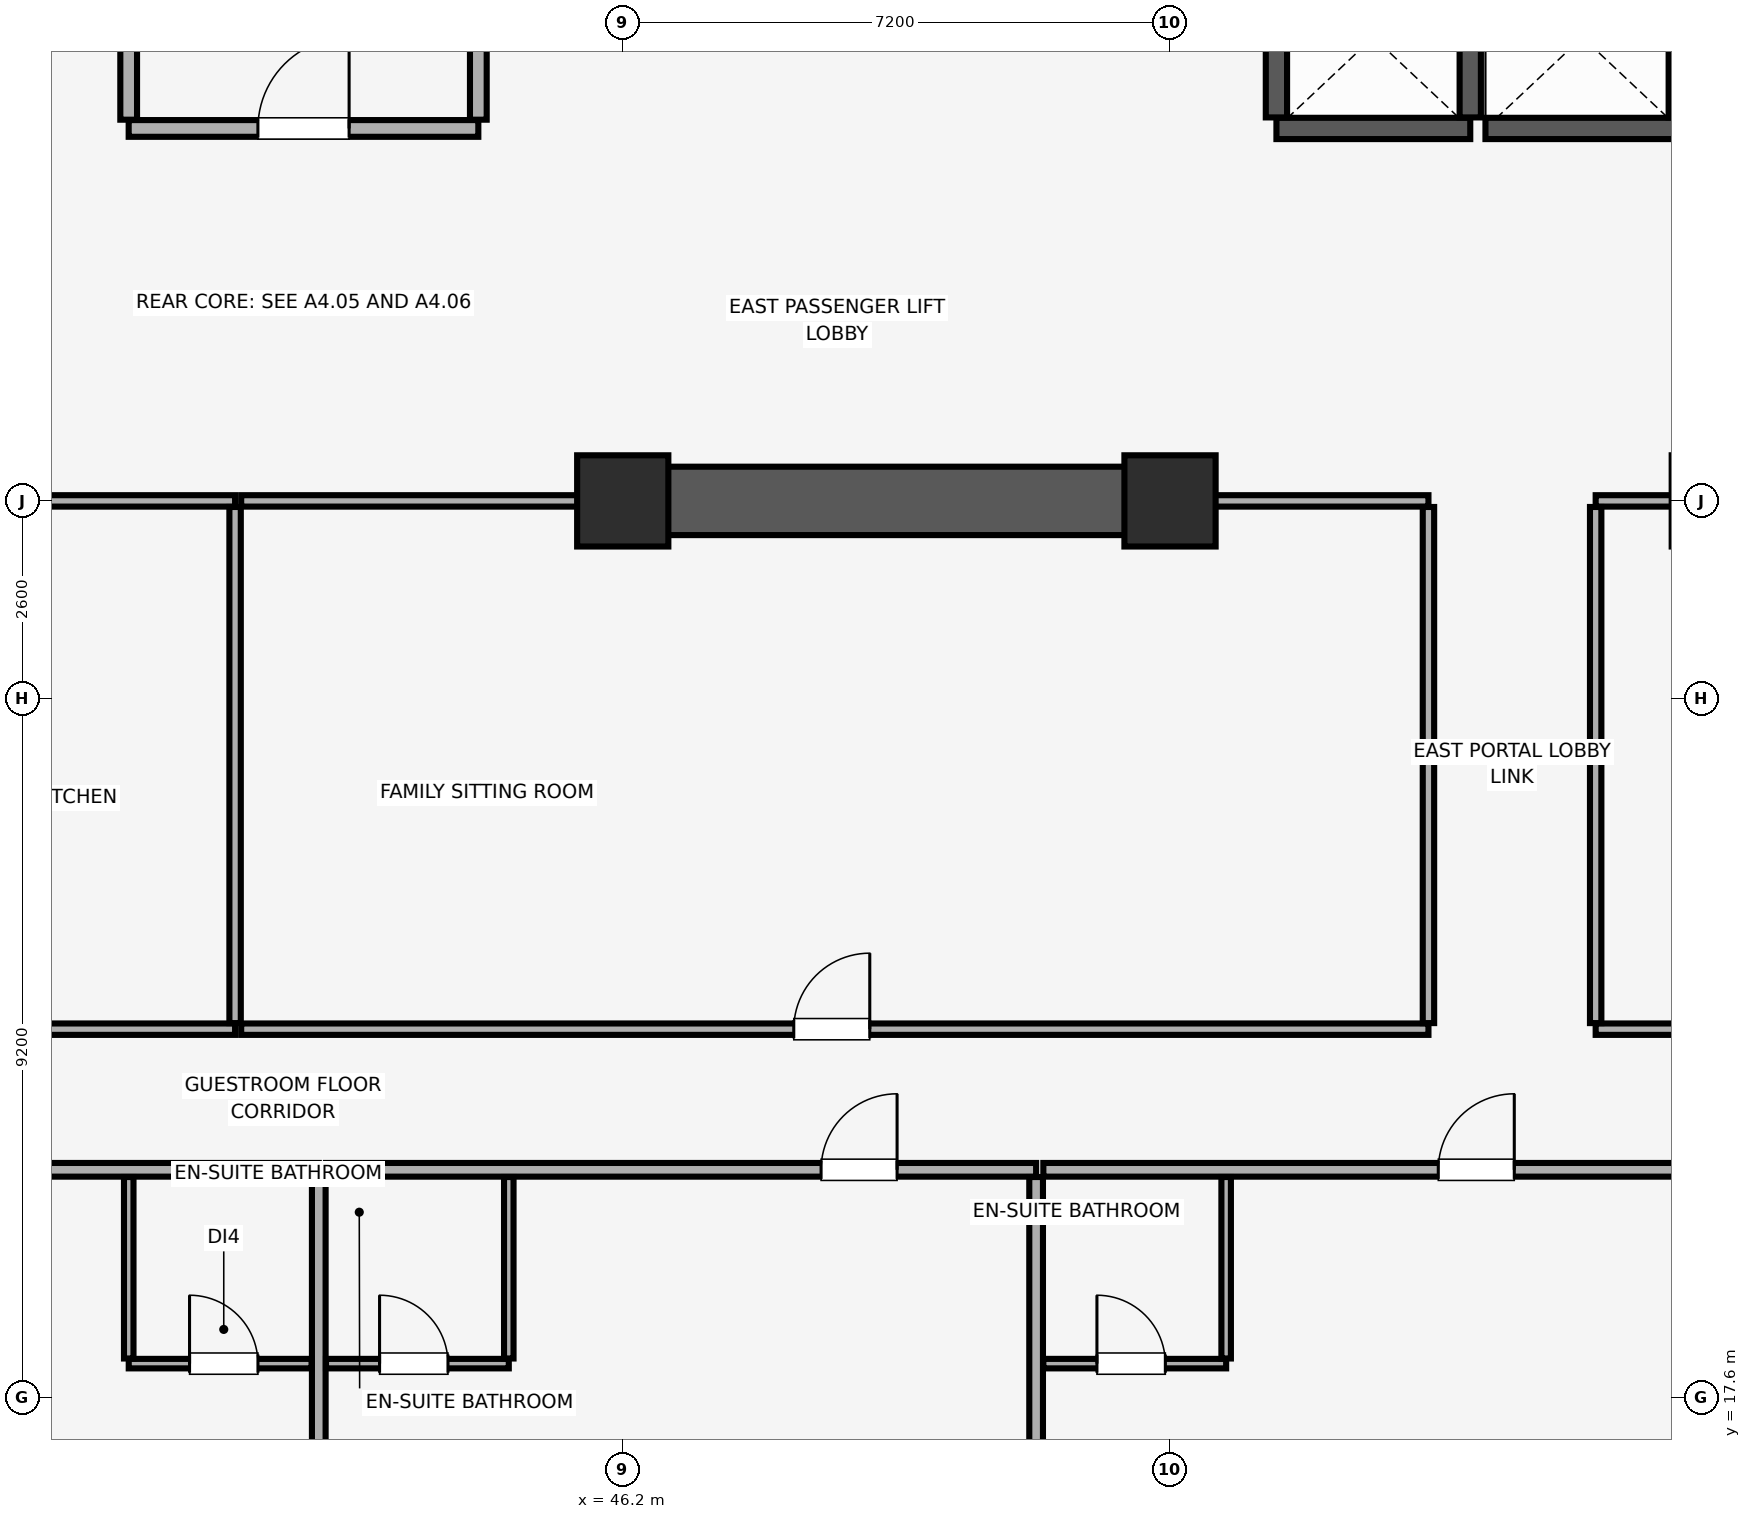
"""IFC4 building model, lengths in metres.
Left out: names, types, materials, properties, quantities, classifications, styles, units other than length and angle.
Written with IfcOpenShell. Run it as: python <this file> out.ifc"""

import sys

from ifc_helpers import new_model, si_unit, direction, frame, frame_2d, origin, origin_2d, place, context, subcontext, project, spatial, rectangle, extrude, element, fill, save


model = new_model("IFC4")
c1 = context("Model", 3, precision=1e-05, world=origin(), true_north=direction((0.0, 1.0)))
c2 = subcontext(c1, "Body", "Model", "MODEL_VIEW")
j1 = project(units=[si_unit("LENGTHUNIT", "METRE"), si_unit("PLANEANGLEUNIT", "RADIAN")], contexts=[c1])
p1 = place(None, origin())
s1 = spatial("IfcSite", under=j1, at=p1, CompositionType="ELEMENT")
p2 = place(p1, origin())
s2 = spatial("IfcBuilding", under=s1, at=p2, CompositionType="ELEMENT")
p3 = place(p2, frame((0.0, 0.0, 93.05)))
s3 = spatial("IfcBuildingStorey", under=s2, at=p3, CompositionType="ELEMENT", Elevation=93.05)
for number, where, z_axis, x_axis in (
    (1, (46.2, 29.4, 0.0), (0.0, 0.0, 1.0), (1.0, 0.0, 0.0)),
    (2, (53.4, 29.4, 0.0), (0.0, 0.0, 1.0), (1.0, 0.0, 0.0)),
):
    element("IfcColumn", number, at=place(p3, frame(where, z_axis=z_axis, x_axis=x_axis)), inside=s3, PredefinedType="COLUMN", context=c2, shape_type="SweptSolid", body=[
        extrude(rectangle(XDim=1.2, YDim=1.2, at=origin_2d()), origin(), (0.0, 0.0, 1.0), 3.51),
    ])
p4 = place(p3, frame((46.0, 29.4, 0.0), z_axis=(0.0, 0.0, 1.0), x_axis=(1.0, 0.0, 0.0)))
e3 = element("IfcWall", 3, at=p4, inside=s3, PredefinedType="SHEAR", context=c2, shape_type="SweptSolid", body=[
    extrude(rectangle(XDim=7.6, YDim=0.9, at=frame_2d((3.8, 0.0))), origin(), (0.0, 0.0, 1.0), 3.51),
])
p5 = place(p3, frame((54.8, 34.3, 0.0), z_axis=(0.0, 0.0, 1.0), x_axis=(1.0, 0.0, 0.0)))
e4 = element("IfcWall", 4, at=p5, inside=s3, PredefinedType="SHEAR", context=c2, shape_type="SweptSolid", body=[
    extrude(rectangle(XDim=2.55, YDim=0.28, at=frame_2d((1.275, 0.0))), origin(), (0.0, 0.0, 1.0), 3.51),
])
for number, where, z_axis, x_axis in (
    (5, (54.8, 34.445, 0.0), (0.0, 0.0, 1.0), (0.0, 1.0, 0.0)),
    (6, (57.35, 34.445, 0.0), (0.0, 0.0, 1.0), (0.0, 1.0, 0.0)),
):
    element("IfcWall", number, at=place(p3, frame(where, z_axis=z_axis, x_axis=x_axis)), inside=s3, PredefinedType="SHEAR", context=c2, shape_type="SweptSolid", body=[
        extrude(rectangle(XDim=2.11, YDim=0.28, at=frame_2d((1.055, 0.0))), origin(), (0.0, 0.0, 1.0), 3.51),
    ])
p6 = place(p3, frame((57.55, 34.3, 0.0), z_axis=(0.0, 0.0, 1.0), x_axis=(1.0, 0.0, 0.0)))
e7 = element("IfcWall", 7, at=p6, inside=s3, PredefinedType="SHEAR", context=c2, shape_type="SweptSolid", body=[
    extrude(rectangle(XDim=2.55, YDim=0.28, at=frame_2d((1.275, 0.0))), origin(), (0.0, 0.0, 1.0), 3.51),
])
p7 = place(p3, frame((60.1, 34.445, 0.0), z_axis=(0.0, 0.0, 1.0), x_axis=(0.0, 1.0, 0.0)))
e8 = element("IfcWall", 8, at=p7, inside=s3, PredefinedType="SHEAR", context=c2, shape_type="SweptSolid", body=[
    extrude(rectangle(XDim=2.11, YDim=0.28, at=frame_2d((1.055, 0.0))), origin(), (0.0, 0.0, 1.0), 3.51),
])
p8 = place(p3, frame((39.7, 34.3, 0.0), z_axis=(0.0, 0.0, 1.0), x_axis=(1.0, 0.0, 0.0)))
e9 = element("IfcWall", 9, at=p8, inside=s3, PredefinedType="PARTITIONING", context=c2, shape_type="SweptSolid", body=[
    extrude(rectangle(XDim=4.6, YDim=0.22, at=frame_2d((2.3, 0.0))), origin(), (0.0, 0.0, 1.0), 3.51),
])
p9 = place(p8, frame((1.7, 0.0, 0.0)))
e10 = element("IfcOpeningElement", 10, at=p9, cuts=e9, PredefinedType="OPENING", context=c2, shape_type="SweptSolid", body=[
    extrude(rectangle(XDim=1.2, YDim=2.15, at=frame_2d((0.6, 1.075))), frame((0.0, 0.12, 0.0), z_axis=(0.0, -1.0, 0.0), x_axis=(1.0, 0.0, 0.0)), (0.0, 0.0, 1.0), 0.24),
])
for number, where, z_axis, x_axis in (
    (11, (39.7, 34.415, 0.0), (0.0, 0.0, 1.0), (0.0, 1.0, 0.0)),
    (12, (44.3, 34.415, 0.0), (0.0, 0.0, 1.0), (0.0, 1.0, 0.0)),
):
    element("IfcWall", number, at=place(p3, frame(where, z_axis=z_axis, x_axis=x_axis)), inside=s3, PredefinedType="PARTITIONING", context=c2, shape_type="SweptSolid", body=[
        extrude(rectangle(XDim=5.785, YDim=0.22, at=frame_2d((2.893, 0.0))), origin(), (0.0, 0.0, 1.0), 3.51),
    ])
p10 = place(p3, frame((32.858, 20.6, 0.0), z_axis=(0.0, 0.0, 1.0), x_axis=(1.0, 0.0, 0.0)))
e13 = element("IfcWall", 13, at=p10, inside=s3, PredefinedType="PARTITIONING", context=c2, shape_type="SweptSolid", body=[
    extrude(rectangle(XDim=9.343, YDim=0.18, at=frame_2d((4.671, 0.0))), origin(), (0.0, 0.0, 1.0), 3.51),
])
p11 = place(p10, frame((1.533, 0.0, 0.0)))
e14 = element("IfcOpeningElement", 14, at=p11, cuts=e13, PredefinedType="OPENING", context=c2, shape_type="SweptSolid", body=[
    extrude(rectangle(XDim=1.0, YDim=2.15, at=frame_2d((0.5, 1.075))), frame((0.0, 0.1, 0.0), z_axis=(0.0, -1.0, 0.0), x_axis=(1.0, 0.0, 0.0)), (0.0, 0.0, 1.0), 0.2),
])
p12 = place(p3, frame((42.201, 0.15, 0.0), z_axis=(0.0, 0.0, 1.0), x_axis=(0.0, 1.0, 0.0)))
e15 = element("IfcWall", 15, at=p12, inside=s3, PredefinedType="PARTITIONING", context=c2, shape_type="SweptSolid", body=[
    extrude(rectangle(XDim=20.355, YDim=0.18, at=frame_2d((10.177, 0.0))), origin(), (0.0, 0.0, 1.0), 2.898),
])
p13 = place(p3, frame((39.701, 18.05, 0.0), z_axis=(0.0, 0.0, 1.0), x_axis=(1.0, 0.0, 0.0)))
e16 = element("IfcWall", 16, at=p13, inside=s3, PredefinedType="PARTITIONING", context=c2, shape_type="SweptSolid", body=[
    extrude(rectangle(XDim=2.405, YDim=0.125, at=frame_2d((1.203, 0.0))), origin(), (0.0, 0.0, 1.0), 3.51),
])
p14 = place(p13, frame((0.8, 0.0, 0.0)))
e17 = element("IfcOpeningElement", 17, at=p14, cuts=e16, PredefinedType="OPENING", context=c2, shape_type="SweptSolid", body=[
    extrude(rectangle(XDim=0.9, YDim=2.1, at=frame_2d((0.45, 1.05))), frame((0.0, 0.073, 0.0), z_axis=(0.0, -1.0, 0.0), x_axis=(1.0, 0.0, 0.0)), (0.0, 0.0, 1.0), 0.145),
])
p15 = place(p3, frame((39.701, 18.117, 0.0), z_axis=(0.0, 0.0, 1.0), x_axis=(0.0, 1.0, 0.0)))
e18 = element("IfcWall", 18, at=p15, inside=s3, PredefinedType="PARTITIONING", context=c2, shape_type="SweptSolid", body=[
    extrude(rectangle(XDim=2.387, YDim=0.125, at=frame_2d((1.194, 0.0))), origin(), (0.0, 0.0, 1.0), 3.51),
])
p16 = place(p3, frame((42.296, 20.6, 0.0), z_axis=(0.0, 0.0, 1.0), x_axis=(1.0, 0.0, 0.0)))
e19 = element("IfcWall", 19, at=p16, inside=s3, PredefinedType="PARTITIONING", context=c2, shape_type="SweptSolid", body=[
    extrude(rectangle(XDim=9.343, YDim=0.18, at=frame_2d((4.671, 0.0))), origin(), (0.0, 0.0, 1.0), 3.51),
])
p17 = place(p16, frame((6.513, 0.0, 0.0)))
e20 = element("IfcOpeningElement", 20, at=p17, cuts=e19, PredefinedType="OPENING", context=c2, shape_type="SweptSolid", body=[
    extrude(rectangle(XDim=1.0, YDim=2.15, at=frame_2d((0.5, 1.075))), frame((0.0, 0.1, 0.0), z_axis=(0.0, -1.0, 0.0), x_axis=(1.0, 0.0, 0.0)), (0.0, 0.0, 1.0), 0.2),
])
p18 = place(p3, frame((51.638, 0.15, 0.0), z_axis=(0.0, 0.0, 1.0), x_axis=(0.0, 1.0, 0.0)))
e21 = element("IfcWall", 21, at=p18, inside=s3, PredefinedType="PARTITIONING", context=c2, shape_type="SweptSolid", body=[
    extrude(rectangle(XDim=20.355, YDim=0.18, at=frame_2d((10.177, 0.0))), origin(), (0.0, 0.0, 1.0), 3.51),
])
p19 = place(p3, frame((42.296, 18.05, 0.0), z_axis=(0.0, 0.0, 1.0), x_axis=(1.0, 0.0, 0.0)))
e22 = element("IfcWall", 22, at=p19, inside=s3, PredefinedType="PARTITIONING", context=c2, shape_type="SweptSolid", body=[
    extrude(rectangle(XDim=2.405, YDim=0.125, at=frame_2d((1.202, 0.0))), origin(), (0.0, 0.0, 1.0), 3.51),
])
p20 = place(p19, frame((0.705, 0.0, 0.0)))
e23 = element("IfcOpeningElement", 23, at=p20, cuts=e22, PredefinedType="OPENING", context=c2, shape_type="SweptSolid", body=[
    extrude(rectangle(XDim=0.9, YDim=2.1, at=frame_2d((0.45, 1.05))), frame((0.0, 0.073, 0.0), z_axis=(0.0, -1.0, 0.0), x_axis=(1.0, 0.0, 0.0)), (0.0, 0.0, 1.0), 0.145),
])
p21 = place(p3, frame((44.701, 18.117, 0.0), z_axis=(0.0, 0.0, 1.0), x_axis=(0.0, 1.0, 0.0)))
e24 = element("IfcWall", 24, at=p21, inside=s3, PredefinedType="PARTITIONING", context=c2, shape_type="SweptSolid", body=[
    extrude(rectangle(XDim=2.387, YDim=0.125, at=frame_2d((1.194, 0.0))), origin(), (0.0, 0.0, 1.0), 3.51),
])
p22 = place(p3, frame((51.733, 20.6, 0.0), z_axis=(0.0, 0.0, 1.0), x_axis=(1.0, 0.0, 0.0)))
e25 = element("IfcWall", 25, at=p22, inside=s3, PredefinedType="PARTITIONING", context=c2, shape_type="SweptSolid", body=[
    extrude(rectangle(XDim=9.343, YDim=0.18, at=frame_2d((4.671, 0.0))), origin(), (0.0, 0.0, 1.0), 3.51),
])
p23 = place(p22, frame((5.196, 0.0, 0.0)))
e26 = element("IfcOpeningElement", 26, at=p23, cuts=e25, PredefinedType="OPENING", context=c2, shape_type="SweptSolid", body=[
    extrude(rectangle(XDim=1.0, YDim=2.15, at=frame_2d((0.5, 1.075))), frame((0.0, 0.1, 0.0), z_axis=(0.0, -1.0, 0.0), x_axis=(1.0, 0.0, 0.0)), (0.0, 0.0, 1.0), 0.2),
])
p24 = place(p3, frame((51.733, 18.05, 0.0), z_axis=(0.0, 0.0, 1.0), x_axis=(1.0, 0.0, 0.0)))
e27 = element("IfcWall", 27, at=p24, inside=s3, PredefinedType="PARTITIONING", context=c2, shape_type="SweptSolid", body=[
    extrude(rectangle(XDim=2.405, YDim=0.125, at=frame_2d((1.203, 0.0))), origin(), (0.0, 0.0, 1.0), 3.51),
])
p25 = place(p24, frame((0.705, 0.0, 0.0)))
e28 = element("IfcOpeningElement", 28, at=p25, cuts=e27, PredefinedType="OPENING", context=c2, shape_type="SweptSolid", body=[
    extrude(rectangle(XDim=0.9, YDim=2.1, at=frame_2d((0.45, 1.05))), frame((0.0, 0.073, 0.0), z_axis=(0.0, -1.0, 0.0), x_axis=(1.0, 0.0, 0.0)), (0.0, 0.0, 1.0), 0.145),
])
p26 = place(p3, frame((54.138, 18.117, 0.0), z_axis=(0.0, 0.0, 1.0), x_axis=(0.0, 1.0, 0.0)))
e29 = element("IfcWall", 29, at=p26, inside=s3, PredefinedType="PARTITIONING", context=c2, shape_type="SweptSolid", body=[
    extrude(rectangle(XDim=2.387, YDim=0.125, at=frame_2d((1.194, 0.0))), origin(), (0.0, 0.0, 1.0), 3.51),
])
p27 = place(p3, frame((27.2, 22.45, 0.0), z_axis=(0.0, 0.0, 1.0), x_axis=(1.0, 0.0, 0.0)))
e30 = element("IfcWall", 30, at=p27, inside=s3, PredefinedType="PARTITIONING", context=c2, shape_type="SweptSolid", body=[
    extrude(rectangle(XDim=13.9, YDim=0.15, at=frame_2d((6.95, 0.0))), origin(), (0.0, 0.0, 1.0), 3.51),
])
p28 = place(p27, frame((6.45, 0.0, 0.0)))
e31 = element("IfcOpeningElement", 31, at=p28, cuts=e30, PredefinedType="OPENING", context=c2, shape_type="SweptSolid", body=[
    extrude(rectangle(XDim=1.0, YDim=2.15, at=frame_2d((0.5, 1.075))), frame((0.0, 0.085, 0.0), z_axis=(0.0, -1.0, 0.0), x_axis=(1.0, 0.0, 0.0)), (0.0, 0.0, 1.0), 0.17),
])
p29 = place(p3, frame((38.01, 29.4, 0.0), z_axis=(0.0, 0.0, 1.0), x_axis=(1.0, 0.0, 0.0)))
e32 = element("IfcWall", 32, at=p29, inside=s3, PredefinedType="PARTITIONING", context=c2, shape_type="SweptSolid", body=[
    extrude(rectangle(XDim=3.09, YDim=0.15, at=frame_2d((1.545, 0.0))), origin(), (0.0, 0.0, 1.0), 2.41),
])
p30 = place(p3, frame((41.1, 22.53, 0.0), z_axis=(0.0, 0.0, 1.0), x_axis=(0.0, 1.0, 0.0)))
e33 = element("IfcWall", 33, at=p30, inside=s3, PredefinedType="PARTITIONING", context=c2, shape_type="SweptSolid", body=[
    extrude(rectangle(XDim=6.79, YDim=0.15, at=frame_2d((3.395, 0.0))), origin(), (0.0, 0.0, 1.0), 3.51),
])
p31 = place(p3, frame((41.18, 22.45, 0.0), z_axis=(0.0, 0.0, 1.0), x_axis=(1.0, 0.0, 0.0)))
e34 = element("IfcWall", 34, at=p31, inside=s3, PredefinedType="PARTITIONING", context=c2, shape_type="SweptSolid", body=[
    extrude(rectangle(XDim=15.62, YDim=0.15, at=frame_2d((7.81, 0.0))), origin(), (0.0, 0.0, 1.0), 3.51),
])
p32 = place(p31, frame((7.27, 0.0, 0.0)))
e35 = element("IfcOpeningElement", 35, at=p32, cuts=e34, PredefinedType="OPENING", context=c2, shape_type="SweptSolid", body=[
    extrude(rectangle(XDim=1.0, YDim=2.15, at=frame_2d((0.5, 1.075))), frame((0.0, 0.085, 0.0), z_axis=(0.0, -1.0, 0.0), x_axis=(1.0, 0.0, 0.0)), (0.0, 0.0, 1.0), 0.17),
])
p33 = place(p3, frame((41.18, 29.4, 0.0), z_axis=(0.0, 0.0, 1.0), x_axis=(1.0, 0.0, 0.0)))
e36 = element("IfcWall", 36, at=p33, inside=s3, PredefinedType="PARTITIONING", context=c2, shape_type="SweptSolid", body=[
    extrude(rectangle(XDim=4.81, YDim=0.15, at=frame_2d((2.405, 0.0))), origin(), (0.0, 0.0, 1.0), 2.41),
])
p34 = place(p3, frame((53.61, 29.4, 0.0), z_axis=(0.0, 0.0, 1.0), x_axis=(1.0, 0.0, 0.0)))
e37 = element("IfcWall", 37, at=p34, inside=s3, PredefinedType="PARTITIONING", context=c2, shape_type="SweptSolid", body=[
    extrude(rectangle(XDim=3.19, YDim=0.15, at=frame_2d((1.595, 0.0))), origin(), (0.0, 0.0, 1.0), 2.41),
])
p35 = place(p3, frame((56.8, 22.53, 0.0), z_axis=(0.0, 0.0, 1.0), x_axis=(0.0, 1.0, 0.0)))
e38 = element("IfcWall", 38, at=p35, inside=s3, PredefinedType="PARTITIONING", context=c2, shape_type="SweptSolid", body=[
    extrude(rectangle(XDim=6.79, YDim=0.15, at=frame_2d((3.395, 0.0))), origin(), (0.0, 0.0, 1.0), 2.977),
])
p36 = place(p3, frame((59.0, 22.45, 0.0), z_axis=(0.0, 0.0, 1.0), x_axis=(1.0, 0.0, 0.0)))
e39 = element("IfcWall", 39, at=p36, inside=s3, PredefinedType="PARTITIONING", context=c2, shape_type="SweptSolid", body=[
    extrude(rectangle(XDim=9.2, YDim=0.15, at=frame_2d((4.6, 0.0))), origin(), (0.0, 0.0, 1.0), 3.51),
])
p37 = place(p36, frame((4.1, 0.0, 0.0)))
e40 = element("IfcOpeningElement", 40, at=p37, cuts=e39, PredefinedType="OPENING", context=c2, shape_type="SweptSolid", body=[
    extrude(rectangle(XDim=1.0, YDim=2.15, at=frame_2d((0.5, 1.075))), frame((0.0, 0.085, 0.0), z_axis=(0.0, -1.0, 0.0), x_axis=(1.0, 0.0, 0.0)), (0.0, 0.0, 1.0), 0.17),
])
p38 = place(p3, frame((59.0, 29.4, 0.0), z_axis=(0.0, 0.0, 1.0), x_axis=(1.0, 0.0, 0.0)))
e41 = element("IfcWall", 41, at=p38, inside=s3, PredefinedType="PARTITIONING", context=c2, shape_type="SweptSolid", body=[
    extrude(rectangle(XDim=1.39, YDim=0.15, at=frame_2d((0.695, 0.0))), origin(), (0.0, 0.0, 1.0), 2.41),
])
p39 = place(p3, frame((59.0, 22.53, 0.0), z_axis=(0.0, 0.0, 1.0), x_axis=(0.0, 1.0, 0.0)))
e42 = element("IfcWall", 42, at=p39, inside=s3, PredefinedType="PARTITIONING", context=c2, shape_type="SweptSolid", body=[
    extrude(rectangle(XDim=6.79, YDim=0.15, at=frame_2d((3.395, 0.0))), origin(), (0.0, 0.0, 1.0), 3.51),
])
p40 = place(p9, origin())
e43 = element("IfcDoor", 43, at=p40, inside=s3, OperationType="SINGLE_SWING_RIGHT", PredefinedType="DOOR", context=c2, shape_type="SweptSolid", body=[
    extrude(rectangle(XDim=1.2, YDim=2.15, at=frame_2d((0.6, 1.075))), frame((0.0, 0.025, 0.0), z_axis=(0.0, -1.0, 0.0), x_axis=(1.0, 0.0, 0.0)), (0.0, 0.0, 1.0), 0.05),
])
fill(e10, e43)
p41 = place(p14, origin())
e44 = element("IfcDoor", 44, at=p41, inside=s3, OperationType="SINGLE_SWING_LEFT", PredefinedType="DOOR", context=c2, shape_type="SweptSolid", body=[
    extrude(rectangle(XDim=0.9, YDim=2.1, at=frame_2d((0.45, 1.05))), frame((0.0, 0.025, 0.0), z_axis=(0.0, -1.0, 0.0), x_axis=(1.0, 0.0, 0.0)), (0.0, 0.0, 1.0), 0.05),
])
fill(e17, e44)
p42 = place(p17, origin())
e45 = element("IfcDoor", 45, at=p42, inside=s3, OperationType="SINGLE_SWING_RIGHT", PredefinedType="DOOR", context=c2, shape_type="SweptSolid", body=[
    extrude(rectangle(XDim=1.0, YDim=2.15, at=frame_2d((0.5, 1.075))), frame((0.0, 0.025, 0.0), z_axis=(0.0, -1.0, 0.0), x_axis=(1.0, 0.0, 0.0)), (0.0, 0.0, 1.0), 0.05),
])
fill(e20, e45)
p43 = place(p20, origin())
e46 = element("IfcDoor", 46, at=p43, inside=s3, OperationType="SINGLE_SWING_LEFT", PredefinedType="DOOR", context=c2, shape_type="SweptSolid", body=[
    extrude(rectangle(XDim=0.9, YDim=2.1, at=frame_2d((0.45, 1.05))), frame((0.0, 0.025, 0.0), z_axis=(0.0, -1.0, 0.0), x_axis=(1.0, 0.0, 0.0)), (0.0, 0.0, 1.0), 0.05),
])
fill(e23, e46)
p44 = place(p23, origin())
e47 = element("IfcDoor", 47, at=p44, inside=s3, OperationType="SINGLE_SWING_RIGHT", PredefinedType="DOOR", context=c2, shape_type="SweptSolid", body=[
    extrude(rectangle(XDim=1.0, YDim=2.15, at=frame_2d((0.5, 1.075))), frame((0.0, 0.025, 0.0), z_axis=(0.0, -1.0, 0.0), x_axis=(1.0, 0.0, 0.0)), (0.0, 0.0, 1.0), 0.05),
])
fill(e26, e47)
p45 = place(p25, origin())
e48 = element("IfcDoor", 48, at=p45, inside=s3, OperationType="SINGLE_SWING_LEFT", PredefinedType="DOOR", context=c2, shape_type="SweptSolid", body=[
    extrude(rectangle(XDim=0.9, YDim=2.1, at=frame_2d((0.45, 1.05))), frame((0.0, 0.025, 0.0), z_axis=(0.0, -1.0, 0.0), x_axis=(1.0, 0.0, 0.0)), (0.0, 0.0, 1.0), 0.05),
])
fill(e28, e48)
p46 = place(p32, origin())
e49 = element("IfcDoor", 49, at=p46, inside=s3, OperationType="SINGLE_SWING_RIGHT", PredefinedType="DOOR", context=c2, shape_type="SweptSolid", body=[
    extrude(rectangle(XDim=1.0, YDim=2.15, at=frame_2d((0.5, 1.075))), frame((0.0, 0.025, 0.0), z_axis=(0.0, -1.0, 0.0), x_axis=(1.0, 0.0, 0.0)), (0.0, 0.0, 1.0), 0.05),
])
fill(e35, e49)
save(model, sys.argv[1])
